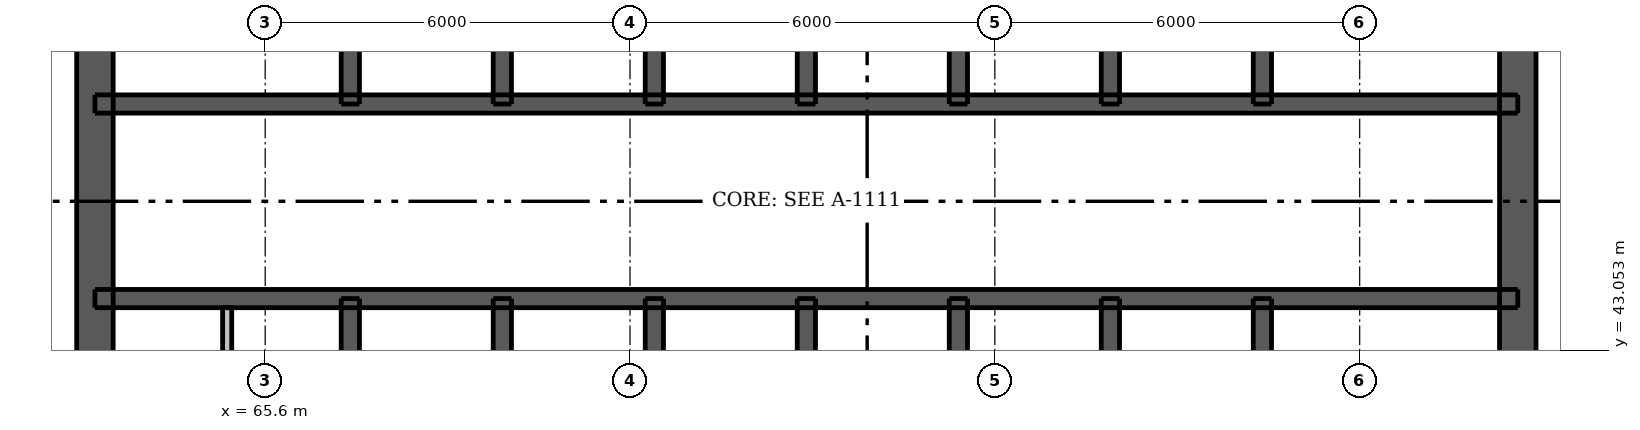
"""IFC4 building model, lengths in metres.
Left out: names, types, materials, properties, quantities, classifications, styles, units other than length and angle.
Written with IfcOpenShell. Run it as: python <this file> out.ifc"""

import sys

from ifc_helpers import new_model, si_unit, direction, frame, frame_2d, origin, place, context, subcontext, project, spatial, rectangle, extrude, element, fill, save


model = new_model("IFC4")
c1 = context("Model", 3, precision=1e-05, world=origin(), true_north=direction((0.0, 1.0)))
c2 = subcontext(c1, "Body", "Model", "MODEL_VIEW")
j1 = project(units=[si_unit("LENGTHUNIT", "METRE"), si_unit("PLANEANGLEUNIT", "RADIAN")], contexts=[c1])
p1 = place(None, origin())
s1 = spatial("IfcSite", under=j1, at=p1, CompositionType="ELEMENT")
p2 = place(p1, origin())
s2 = spatial("IfcBuilding", under=s1, at=p2, CompositionType="ELEMENT")
p3 = place(p2, frame((0.0, 0.0, 206.8)))
s3 = spatial("IfcBuildingStorey", under=s2, at=p3, CompositionType="ELEMENT", Elevation=206.8)
p4 = place(p3, frame((62.8, 33.5, 0.0), z_axis=(0.0, 0.0, 1.0), x_axis=(0.0, 1.0, 0.0)))
e1 = element("IfcWall", 1, at=p4, inside=s3, PredefinedType="SHEAR", context=c2, shape_type="SweptSolid", body=[
    extrude(rectangle(XDim=24.0, YDim=0.6, at=frame_2d((12.0, 0.0))), origin(), (0.0, 0.0, 1.0), 3.05),
])
p5 = place(p4, frame((11.2, 0.0, 0.0)))
e2 = element("IfcOpeningElement", 2, at=p5, cuts=e1, PredefinedType="OPENING", context=c2, shape_type="SweptSolid", body=[
    extrude(rectangle(XDim=1.6, YDim=2.1, at=frame_2d((0.8, 1.05))), frame((0.0, 0.31, 0.0), z_axis=(0.0, -1.0, 0.0), x_axis=(1.0, 0.0, 0.0)), (0.0, 0.0, 1.0), 0.62),
])
p6 = place(p3, frame((86.2, 33.5, 0.0), z_axis=(0.0, 0.0, 1.0), x_axis=(0.0, 1.0, 0.0)))
e3 = element("IfcWall", 3, at=p6, inside=s3, PredefinedType="SHEAR", context=c2, shape_type="SweptSolid", body=[
    extrude(rectangle(XDim=24.0, YDim=0.6, at=frame_2d((12.0, 0.0))), origin(), (0.0, 0.0, 1.0), 3.05),
])
p7 = place(p6, frame((11.2, 0.0, 0.0)))
e4 = element("IfcOpeningElement", 4, at=p7, cuts=e3, PredefinedType="OPENING", context=c2, shape_type="SweptSolid", body=[
    extrude(rectangle(XDim=1.6, YDim=2.1, at=frame_2d((0.8, 1.05))), frame((0.0, 0.31, 0.0), z_axis=(0.0, -1.0, 0.0), x_axis=(1.0, 0.0, 0.0)), (0.0, 0.0, 1.0), 0.62),
])
p8 = place(p3, frame((62.8, 43.9, 0.0), z_axis=(0.0, 0.0, 1.0), x_axis=(1.0, 0.0, 0.0)))
e5 = element("IfcWall", 5, at=p8, inside=s3, PredefinedType="SHEAR", context=c2, shape_type="SweptSolid", body=[
    extrude(rectangle(XDim=23.4, YDim=0.3, at=frame_2d((11.7, 0.0))), origin(), (0.0, 0.0, 1.0), 3.05),
])
p9 = place(p8, frame((0.788, 0.0, 0.0)))
e6 = element("IfcOpeningElement", 6, at=p9, cuts=e5, PredefinedType="OPENING", context=c2, shape_type="SweptSolid", body=[
    extrude(rectangle(XDim=0.9, YDim=2.1, at=frame_2d((0.45, 1.05))), frame((0.0, 0.16, 0.0), z_axis=(0.0, -1.0, 0.0), x_axis=(1.0, 0.0, 0.0)), (0.0, 0.0, 1.0), 0.32),
])
p10 = place(p8, frame((2.663, 0.0, 0.0)))
e7 = element("IfcOpeningElement", 7, at=p10, cuts=e5, PredefinedType="OPENING", context=c2, shape_type="SweptSolid", body=[
    extrude(rectangle(XDim=0.9, YDim=2.1, at=frame_2d((0.45, 1.05))), frame((0.0, 0.16, 0.0), z_axis=(0.0, -1.0, 0.0), x_axis=(1.0, 0.0, 0.0)), (0.0, 0.0, 1.0), 0.32),
])
p11 = place(p8, frame((20.775, 0.0, 0.0)))
e8 = element("IfcOpeningElement", 8, at=p11, cuts=e5, PredefinedType="OPENING", context=c2, shape_type="SweptSolid", body=[
    extrude(rectangle(XDim=0.9, YDim=2.1, at=frame_2d((0.45, 1.05))), frame((0.0, 0.16, 0.0), z_axis=(0.0, -1.0, 0.0), x_axis=(1.0, 0.0, 0.0)), (0.0, 0.0, 1.0), 0.32),
])
p12 = place(p8, frame((5.0, 0.0, 0.0)))
e9 = element("IfcOpeningElement", 9, at=p12, cuts=e5, PredefinedType="OPENING", context=c2, shape_type="SweptSolid", body=[
    extrude(rectangle(XDim=0.9, YDim=2.1, at=frame_2d((0.45, 1.05))), frame((0.0, 0.16, 0.0), z_axis=(0.0, -1.0, 0.0), x_axis=(1.0, 0.0, 0.0)), (0.0, 0.0, 1.0), 0.32),
])
p13 = place(p8, frame((10.0, 0.0, 0.0)))
e10 = element("IfcOpeningElement", 10, at=p13, cuts=e5, PredefinedType="OPENING", context=c2, shape_type="SweptSolid", body=[
    extrude(rectangle(XDim=0.9, YDim=2.1, at=frame_2d((0.45, 1.05))), frame((0.0, 0.16, 0.0), z_axis=(0.0, -1.0, 0.0), x_axis=(1.0, 0.0, 0.0)), (0.0, 0.0, 1.0), 0.32),
])
p14 = place(p8, frame((12.5, 0.0, 0.0)))
e11 = element("IfcOpeningElement", 11, at=p14, cuts=e5, PredefinedType="OPENING", context=c2, shape_type="SweptSolid", body=[
    extrude(rectangle(XDim=0.9, YDim=2.1, at=frame_2d((0.45, 1.05))), frame((0.0, 0.16, 0.0), z_axis=(0.0, -1.0, 0.0), x_axis=(1.0, 0.0, 0.0)), (0.0, 0.0, 1.0), 0.32),
])
p15 = place(p8, frame((17.5, 0.0, 0.0)))
e12 = element("IfcOpeningElement", 12, at=p15, cuts=e5, PredefinedType="OPENING", context=c2, shape_type="SweptSolid", body=[
    extrude(rectangle(XDim=0.9, YDim=2.1, at=frame_2d((0.45, 1.05))), frame((0.0, 0.16, 0.0), z_axis=(0.0, -1.0, 0.0), x_axis=(1.0, 0.0, 0.0)), (0.0, 0.0, 1.0), 0.32),
])
p16 = place(p3, frame((62.8, 47.1, 0.0), z_axis=(0.0, 0.0, 1.0), x_axis=(1.0, 0.0, 0.0)))
e13 = element("IfcWall", 13, at=p16, inside=s3, PredefinedType="SHEAR", context=c2, shape_type="SweptSolid", body=[
    extrude(rectangle(XDim=23.4, YDim=0.3, at=frame_2d((11.7, 0.0))), origin(), (0.0, 0.0, 1.0), 3.05),
])
p17 = place(p16, frame((1.725, 0.0, 0.0)))
e14 = element("IfcOpeningElement", 14, at=p17, cuts=e13, PredefinedType="OPENING", context=c2, shape_type="SweptSolid", body=[
    extrude(rectangle(XDim=0.9, YDim=2.1, at=frame_2d((0.45, 1.05))), frame((0.0, 0.16, 0.0), z_axis=(0.0, -1.0, 0.0), x_axis=(1.0, 0.0, 0.0)), (0.0, 0.0, 1.0), 0.32),
])
p18 = place(p16, frame((20.775, 0.0, 0.0)))
e15 = element("IfcOpeningElement", 15, at=p18, cuts=e13, PredefinedType="OPENING", context=c2, shape_type="SweptSolid", body=[
    extrude(rectangle(XDim=0.9, YDim=2.1, at=frame_2d((0.45, 1.05))), frame((0.0, 0.16, 0.0), z_axis=(0.0, -1.0, 0.0), x_axis=(1.0, 0.0, 0.0)), (0.0, 0.0, 1.0), 0.32),
])
p19 = place(p16, frame((4.9, 0.0, 0.0)))
e16 = element("IfcOpeningElement", 16, at=p19, cuts=e13, PredefinedType="OPENING", context=c2, shape_type="SweptSolid", body=[
    extrude(rectangle(XDim=1.1, YDim=2.1, at=frame_2d((0.55, 1.05))), frame((0.0, 0.16, 0.0), z_axis=(0.0, -1.0, 0.0), x_axis=(1.0, 0.0, 0.0)), (0.0, 0.0, 1.0), 0.32),
])
p20 = place(p16, frame((7.4, 0.0, 0.0)))
e17 = element("IfcOpeningElement", 17, at=p20, cuts=e13, PredefinedType="OPENING", context=c2, shape_type="SweptSolid", body=[
    extrude(rectangle(XDim=1.1, YDim=2.1, at=frame_2d((0.55, 1.05))), frame((0.0, 0.16, 0.0), z_axis=(0.0, -1.0, 0.0), x_axis=(1.0, 0.0, 0.0)), (0.0, 0.0, 1.0), 0.32),
])
p21 = place(p16, frame((9.9, 0.0, 0.0)))
e18 = element("IfcOpeningElement", 18, at=p21, cuts=e13, PredefinedType="OPENING", context=c2, shape_type="SweptSolid", body=[
    extrude(rectangle(XDim=1.1, YDim=2.1, at=frame_2d((0.55, 1.05))), frame((0.0, 0.16, 0.0), z_axis=(0.0, -1.0, 0.0), x_axis=(1.0, 0.0, 0.0)), (0.0, 0.0, 1.0), 0.32),
])
p22 = place(p16, frame((12.4, 0.0, 0.0)))
e19 = element("IfcOpeningElement", 19, at=p22, cuts=e13, PredefinedType="OPENING", context=c2, shape_type="SweptSolid", body=[
    extrude(rectangle(XDim=1.1, YDim=2.1, at=frame_2d((0.55, 1.05))), frame((0.0, 0.16, 0.0), z_axis=(0.0, -1.0, 0.0), x_axis=(1.0, 0.0, 0.0)), (0.0, 0.0, 1.0), 0.32),
])
p23 = place(p16, frame((14.9, 0.0, 0.0)))
e20 = element("IfcOpeningElement", 20, at=p23, cuts=e13, PredefinedType="OPENING", context=c2, shape_type="SweptSolid", body=[
    extrude(rectangle(XDim=1.1, YDim=2.1, at=frame_2d((0.55, 1.05))), frame((0.0, 0.16, 0.0), z_axis=(0.0, -1.0, 0.0), x_axis=(1.0, 0.0, 0.0)), (0.0, 0.0, 1.0), 0.32),
])
p24 = place(p16, frame((17.4, 0.0, 0.0)))
e21 = element("IfcOpeningElement", 21, at=p24, cuts=e13, PredefinedType="OPENING", context=c2, shape_type="SweptSolid", body=[
    extrude(rectangle(XDim=1.1, YDim=2.1, at=frame_2d((0.55, 1.05))), frame((0.0, 0.16, 0.0), z_axis=(0.0, -1.0, 0.0), x_axis=(1.0, 0.0, 0.0)), (0.0, 0.0, 1.0), 0.32),
])
p25 = place(p3, frame((67.0, 33.8, 0.0), z_axis=(0.0, 0.0, 1.0), x_axis=(0.0, 1.0, 0.0)))
e22 = element("IfcWall", 22, at=p25, inside=s3, PredefinedType="SHEAR", context=c2, shape_type="SweptSolid", body=[
    extrude(rectangle(XDim=10.1, YDim=0.3, at=frame_2d((5.05, 0.0))), origin(), (0.0, 0.0, 1.0), 3.05),
])
p26 = place(p25, frame((0.5, 0.0, 0.0)))
e23 = element("IfcOpeningElement", 23, at=p26, cuts=e22, PredefinedType="OPENING", context=c2, shape_type="SweptSolid", body=[
    extrude(rectangle(XDim=1.1, YDim=2.1, at=frame_2d((0.55, 1.05))), frame((0.0, 0.16, 0.0), z_axis=(0.0, -1.0, 0.0), x_axis=(1.0, 0.0, 0.0)), (0.0, 0.0, 1.0), 0.32),
])
for number, where, z_axis, x_axis in (
    (24, (67.0, 47.1, 0.0), (0.0, 0.0, 1.0), (0.0, 1.0, 0.0)),
    (25, (82.0, 33.8, 0.0), (0.0, 0.0, 1.0), (0.0, 1.0, 0.0)),
    (26, (82.0, 47.1, 0.0), (0.0, 0.0, 1.0), (0.0, 1.0, 0.0)),
):
    element("IfcWall", number, at=place(p3, frame(where, z_axis=z_axis, x_axis=x_axis)), inside=s3, PredefinedType="SHEAR", context=c2, shape_type="SweptSolid", body=[
        extrude(rectangle(XDim=10.1, YDim=0.3, at=frame_2d((5.05, 0.0))), origin(), (0.0, 0.0, 1.0), 3.05),
    ])
for number, where, z_axis, x_axis in (
    (27, (69.5, 41.0, 0.0), (0.0, 0.0, 1.0), (0.0, 1.0, 0.0)),
    (28, (69.5, 47.1, 0.0), (0.0, 0.0, 1.0), (0.0, 1.0, 0.0)),
    (29, (72.0, 41.0, 0.0), (0.0, 0.0, 1.0), (0.0, 1.0, 0.0)),
    (30, (72.0, 47.1, 0.0), (0.0, 0.0, 1.0), (0.0, 1.0, 0.0)),
    (31, (74.5, 41.0, 0.0), (0.0, 0.0, 1.0), (0.0, 1.0, 0.0)),
    (32, (74.5, 47.1, 0.0), (0.0, 0.0, 1.0), (0.0, 1.0, 0.0)),
    (33, (77.0, 41.0, 0.0), (0.0, 0.0, 1.0), (0.0, 1.0, 0.0)),
    (34, (77.0, 47.1, 0.0), (0.0, 0.0, 1.0), (0.0, 1.0, 0.0)),
    (35, (79.5, 41.0, 0.0), (0.0, 0.0, 1.0), (0.0, 1.0, 0.0)),
    (36, (79.5, 47.1, 0.0), (0.0, 0.0, 1.0), (0.0, 1.0, 0.0)),
):
    element("IfcWall", number, at=place(p3, frame(where, z_axis=z_axis, x_axis=x_axis)), inside=s3, PredefinedType="SHEAR", context=c2, shape_type="SweptSolid", body=[
        extrude(rectangle(XDim=2.9, YDim=0.3, at=frame_2d((1.45, 0.0))), origin(), (0.0, 0.0, 1.0), 3.05),
    ])
p27 = place(p3, frame((64.975, 41.15, 0.0), z_axis=(0.0, 0.0, 1.0), x_axis=(0.0, 1.0, 0.0)))
e37 = element("IfcWall", 37, at=p27, inside=s3, PredefinedType="PLUMBINGWALL", context=c2, shape_type="SweptSolid", body=[
    extrude(rectangle(XDim=2.6, YDim=0.15, at=frame_2d((1.3, 0.0))), origin(), (0.0, 0.0, 1.0), 3.05),
])
p28 = place(p5, origin())
e38 = element("IfcDoor", 38, at=p28, inside=s3, OperationType="DOUBLE_DOOR_SINGLE_SWING", PredefinedType="DOOR", context=c2, shape_type="SweptSolid", body=[
    extrude(rectangle(XDim=1.6, YDim=2.1, at=frame_2d((0.8, 1.05))), frame((0.0, -0.237, 0.0), z_axis=(0.0, -1.0, 0.0), x_axis=(1.0, 0.0, 0.0)), (0.0, 0.0, 1.0), 0.05),
])
fill(e2, e38)
p29 = place(p7, origin())
e39 = element("IfcDoor", 39, at=p29, inside=s3, OperationType="DOUBLE_DOOR_SINGLE_SWING", PredefinedType="DOOR", context=c2, shape_type="SweptSolid", body=[
    extrude(rectangle(XDim=1.6, YDim=2.1, at=frame_2d((0.8, 1.05))), frame((0.0, 0.288, 0.0), z_axis=(0.0, -1.0, 0.0), x_axis=(1.0, 0.0, 0.0)), (0.0, 0.0, 1.0), 0.05),
])
fill(e4, e39)
p30 = place(p9, origin())
e40 = element("IfcDoor", 40, at=p30, inside=s3, OperationType="SINGLE_SWING_LEFT", PredefinedType="DOOR", context=c2, shape_type="SweptSolid", body=[
    extrude(rectangle(XDim=0.9, YDim=2.1, at=frame_2d((0.45, 1.05))), frame((0.0, -0.087, 0.0), z_axis=(0.0, -1.0, 0.0), x_axis=(1.0, 0.0, 0.0)), (0.0, 0.0, 1.0), 0.05),
])
fill(e6, e40)
p31 = place(p10, origin())
e41 = element("IfcDoor", 41, at=p31, inside=s3, OperationType="SINGLE_SWING_RIGHT", PredefinedType="DOOR", context=c2, shape_type="SweptSolid", body=[
    extrude(rectangle(XDim=0.9, YDim=2.1, at=frame_2d((0.45, 1.05))), frame((0.0, -0.087, 0.0), z_axis=(0.0, -1.0, 0.0), x_axis=(1.0, 0.0, 0.0)), (0.0, 0.0, 1.0), 0.05),
])
fill(e7, e41)
p32 = place(p11, origin())
e42 = element("IfcDoor", 42, at=p32, inside=s3, OperationType="SINGLE_SWING_LEFT", PredefinedType="DOOR", context=c2, shape_type="SweptSolid", body=[
    extrude(rectangle(XDim=0.9, YDim=2.1, at=frame_2d((0.45, 1.05))), frame((0.0, -0.087, 0.0), z_axis=(0.0, -1.0, 0.0), x_axis=(1.0, 0.0, 0.0)), (0.0, 0.0, 1.0), 0.05),
])
fill(e8, e42)
p33 = place(p17, origin())
e43 = element("IfcDoor", 43, at=p33, inside=s3, OperationType="SINGLE_SWING_LEFT", PredefinedType="DOOR", context=c2, shape_type="SweptSolid", body=[
    extrude(rectangle(XDim=0.9, YDim=2.1, at=frame_2d((0.45, 1.05))), frame((0.0, 0.138, 0.0), z_axis=(0.0, -1.0, 0.0), x_axis=(1.0, 0.0, 0.0)), (0.0, 0.0, 1.0), 0.05),
])
fill(e14, e43)
p34 = place(p18, origin())
e44 = element("IfcDoor", 44, at=p34, inside=s3, OperationType="SINGLE_SWING_LEFT", PredefinedType="DOOR", context=c2, shape_type="SweptSolid", body=[
    extrude(rectangle(XDim=0.9, YDim=2.1, at=frame_2d((0.45, 1.05))), frame((0.0, 0.138, 0.0), z_axis=(0.0, -1.0, 0.0), x_axis=(1.0, 0.0, 0.0)), (0.0, 0.0, 1.0), 0.05),
])
fill(e15, e44)
p35 = place(p12, origin())
e45 = element("IfcDoor", 45, at=p35, inside=s3, OperationType="SINGLE_SWING_RIGHT", PredefinedType="DOOR", context=c2, shape_type="SweptSolid", body=[
    extrude(rectangle(XDim=0.9, YDim=2.1, at=frame_2d((0.45, 1.05))), frame((0.0, -0.087, 0.0), z_axis=(0.0, -1.0, 0.0), x_axis=(1.0, 0.0, 0.0)), (0.0, 0.0, 1.0), 0.05),
])
fill(e9, e45)
p36 = place(p13, origin())
e46 = element("IfcDoor", 46, at=p36, inside=s3, OperationType="SINGLE_SWING_RIGHT", PredefinedType="DOOR", context=c2, shape_type="SweptSolid", body=[
    extrude(rectangle(XDim=0.9, YDim=2.1, at=frame_2d((0.45, 1.05))), frame((0.0, -0.087, 0.0), z_axis=(0.0, -1.0, 0.0), x_axis=(1.0, 0.0, 0.0)), (0.0, 0.0, 1.0), 0.05),
])
fill(e10, e46)
p37 = place(p14, origin())
e47 = element("IfcDoor", 47, at=p37, inside=s3, OperationType="SINGLE_SWING_LEFT", PredefinedType="DOOR", context=c2, shape_type="SweptSolid", body=[
    extrude(rectangle(XDim=0.9, YDim=2.1, at=frame_2d((0.45, 1.05))), frame((0.0, -0.087, 0.0), z_axis=(0.0, -1.0, 0.0), x_axis=(1.0, 0.0, 0.0)), (0.0, 0.0, 1.0), 0.05),
])
fill(e11, e47)
p38 = place(p15, origin())
e48 = element("IfcDoor", 48, at=p38, inside=s3, OperationType="SINGLE_SWING_LEFT", PredefinedType="DOOR", context=c2, shape_type="SweptSolid", body=[
    extrude(rectangle(XDim=0.9, YDim=2.1, at=frame_2d((0.45, 1.05))), frame((0.0, -0.087, 0.0), z_axis=(0.0, -1.0, 0.0), x_axis=(1.0, 0.0, 0.0)), (0.0, 0.0, 1.0), 0.05),
])
fill(e12, e48)
p39 = place(p19, origin())
e49 = element("IfcDoor", 49, at=p39, inside=s3, OperationType="DOUBLE_DOOR_SLIDING", PredefinedType="DOOR", context=c2, shape_type="SweptSolid", body=[
    extrude(rectangle(XDim=1.1, YDim=2.1, at=frame_2d((0.55, 1.05))), frame((0.0, 0.025, 0.0), z_axis=(0.0, -1.0, 0.0), x_axis=(1.0, 0.0, 0.0)), (0.0, 0.0, 1.0), 0.05),
])
fill(e16, e49)
p40 = place(p20, origin())
e50 = element("IfcDoor", 50, at=p40, inside=s3, OperationType="DOUBLE_DOOR_SLIDING", PredefinedType="DOOR", context=c2, shape_type="SweptSolid", body=[
    extrude(rectangle(XDim=1.1, YDim=2.1, at=frame_2d((0.55, 1.05))), frame((0.0, 0.025, 0.0), z_axis=(0.0, -1.0, 0.0), x_axis=(1.0, 0.0, 0.0)), (0.0, 0.0, 1.0), 0.05),
])
fill(e17, e50)
p41 = place(p21, origin())
e51 = element("IfcDoor", 51, at=p41, inside=s3, OperationType="DOUBLE_DOOR_SLIDING", PredefinedType="DOOR", context=c2, shape_type="SweptSolid", body=[
    extrude(rectangle(XDim=1.1, YDim=2.1, at=frame_2d((0.55, 1.05))), frame((0.0, 0.025, 0.0), z_axis=(0.0, -1.0, 0.0), x_axis=(1.0, 0.0, 0.0)), (0.0, 0.0, 1.0), 0.05),
])
fill(e18, e51)
p42 = place(p22, origin())
e52 = element("IfcDoor", 52, at=p42, inside=s3, OperationType="DOUBLE_DOOR_SLIDING", PredefinedType="DOOR", context=c2, shape_type="SweptSolid", body=[
    extrude(rectangle(XDim=1.1, YDim=2.1, at=frame_2d((0.55, 1.05))), frame((0.0, 0.025, 0.0), z_axis=(0.0, -1.0, 0.0), x_axis=(1.0, 0.0, 0.0)), (0.0, 0.0, 1.0), 0.05),
])
fill(e19, e52)
p43 = place(p23, origin())
e53 = element("IfcDoor", 53, at=p43, inside=s3, OperationType="DOUBLE_DOOR_SLIDING", PredefinedType="DOOR", context=c2, shape_type="SweptSolid", body=[
    extrude(rectangle(XDim=1.1, YDim=2.1, at=frame_2d((0.55, 1.05))), frame((0.0, 0.025, 0.0), z_axis=(0.0, -1.0, 0.0), x_axis=(1.0, 0.0, 0.0)), (0.0, 0.0, 1.0), 0.05),
])
fill(e20, e53)
p44 = place(p24, origin())
e54 = element("IfcDoor", 54, at=p44, inside=s3, OperationType="DOUBLE_DOOR_SLIDING", PredefinedType="DOOR", context=c2, shape_type="SweptSolid", body=[
    extrude(rectangle(XDim=1.1, YDim=2.1, at=frame_2d((0.55, 1.05))), frame((0.0, 0.025, 0.0), z_axis=(0.0, -1.0, 0.0), x_axis=(1.0, 0.0, 0.0)), (0.0, 0.0, 1.0), 0.05),
])
fill(e21, e54)
save(model, sys.argv[1])
